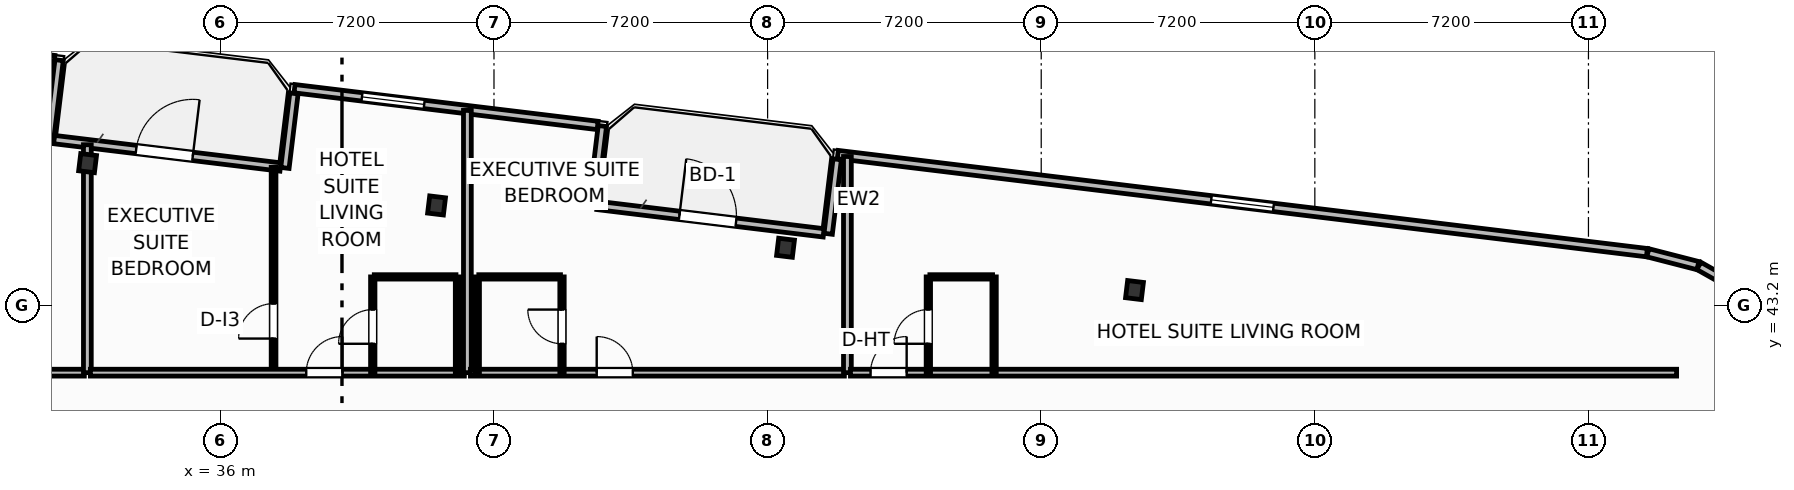
"""IFC4 building model, lengths in metres.
Left out: names, types, materials, properties, quantities, classifications, styles, units other than length and angle.
Written with IfcOpenShell. Run it as: python <this file> out.ifc"""

import sys

from ifc_helpers import new_model, si_unit, direction, frame, frame_2d, origin, origin_2d, place, context, subcontext, project, spatial, rectangle, i_section, extrude, element, fill, save


model = new_model("IFC4")
c1 = context("Model", 3, precision=1e-05, world=origin(), true_north=direction((0.0, 1.0)))
c2 = subcontext(c1, "Body", "Model", "MODEL_VIEW")
j1 = project(units=[si_unit("LENGTHUNIT", "METRE"), si_unit("PLANEANGLEUNIT", "RADIAN")], contexts=[c1])
p1 = place(None, origin())
s1 = spatial("IfcSite", under=j1, at=p1, CompositionType="ELEMENT")
p2 = place(p1, origin())
s2 = spatial("IfcBuilding", under=s1, at=p2, CompositionType="ELEMENT")
p3 = place(p2, frame((0.0, 0.0, 129.1)))
s3 = spatial("IfcBuildingStorey", under=s2, at=p3, CompositionType="ELEMENT", Elevation=129.1)
for number, where, z_axis, x_axis in (
    (1, (60.054, 43.603, 0.0), (0.0, 0.0, 1.0), (0.993, -0.12, 0.0)),
    (2, (50.872, 44.717, 0.0), (0.0, 0.0, 1.0), (0.993, -0.12, 0.0)),
    (3, (41.689, 45.83, 0.0), (0.0, 0.0, 1.0), (0.993, -0.12, 0.0)),
    (4, (32.506, 46.943, 0.0), (0.0, 0.0, 1.0), (0.993, -0.12, 0.0)),
):
    element("IfcColumn", number, at=place(p3, frame(where, z_axis=z_axis, x_axis=x_axis)), inside=s3, PredefinedType="COLUMN", context=c2, shape_type="SweptSolid", body=[
        extrude(i_section(OverallWidth=0.418, OverallDepth=0.455, WebThickness=0.042, FlangeThickness=0.068, FilletRadius=0.025, at=origin_2d()), origin(), (0.0, 0.0, 1.0), 3.7),
    ])
p4 = place(p3, frame((31.624, 47.563, 0.0), z_axis=(0.0, 0.0, 1.0), x_axis=(0.992729951822, -0.120362962556, 0.0)))
e5 = element("IfcWall", 5, at=p4, inside=s3, PredefinedType="SOLIDWALL", context=c2, shape_type="SweptSolid", body=[
    extrude(rectangle(XDim=6.0, YDim=0.22, at=frame_2d((3.0, 0.0))), origin(), (0.0, 0.0, 1.0), 2.73),
])
p5 = place(p4, frame((2.176, 0.0, 0.0)))
e6 = element("IfcOpeningElement", 6, at=p5, cuts=e5, PredefinedType="OPENING", context=c2, shape_type="SweptSolid", body=[
    extrude(rectangle(XDim=1.5, YDim=2.25, at=frame_2d((0.75, 1.125))), frame((0.0, 0.12, 0.0), z_axis=(0.0, -1.0, 0.0), x_axis=(1.0, 0.0, 0.0)), (0.0, 0.0, 1.0), 0.24),
])
p6 = place(p3, frame((45.92, 45.831, 0.0), z_axis=(0.0, 0.0, 1.0), x_axis=(0.992729951822, -0.120362962556, 0.0)))
e7 = element("IfcWall", 7, at=p6, inside=s3, PredefinedType="SOLIDWALL", context=c2, shape_type="SweptSolid", body=[
    extrude(rectangle(XDim=6.0, YDim=0.22, at=frame_2d((3.0, 0.0))), origin(), (0.0, 0.0, 1.0), 2.73),
])
p7 = place(p6, frame((2.176, 0.0, 0.0)))
e8 = element("IfcOpeningElement", 8, at=p7, cuts=e7, PredefinedType="OPENING", context=c2, shape_type="SweptSolid", body=[
    extrude(rectangle(XDim=1.5, YDim=2.25, at=frame_2d((0.75, 1.125))), frame((0.0, 0.12, 0.0), z_axis=(0.0, -1.0, 0.0), x_axis=(1.0, 0.0, 0.0)), (0.0, 0.0, 1.0), 0.24),
])
p8 = place(p3, frame((76.084, 43.575, 0.0), z_axis=(0.0, 0.0, 1.0), x_axis=(-0.871093268227, 0.491117621399, 0.0)))
e9 = element("IfcWall", 9, at=p8, inside=s3, PredefinedType="SOLIDWALL", context=c2, shape_type="SweptSolid", body=[
    extrude(rectangle(XDim=1.353, YDim=0.22, at=frame_2d((0.677, 0.0))), origin(), (0.0, 0.0, 1.0), 2.73),
])
p9 = place(p3, frame((74.881, 44.246, 0.0), z_axis=(0.0, 0.0, 1.0), x_axis=(-0.968549775063, 0.248819881091, 0.0)))
e10 = element("IfcWall", 10, at=p9, inside=s3, PredefinedType="SOLIDWALL", context=c2, shape_type="SweptSolid", body=[
    extrude(rectangle(XDim=1.361, YDim=0.22, at=frame_2d((0.68, 0.0))), origin(), (0.0, 0.0, 1.0), 2.73),
])
p10 = place(p3, frame((73.538, 44.588, 0.0), z_axis=(0.0, 0.0, 1.0), x_axis=(-0.992733493583, 0.120333747213, 0.0)))
e11 = element("IfcWall", 11, at=p10, inside=s3, PredefinedType="SOLIDWALL", context=c2, shape_type="SweptSolid", body=[
    extrude(rectangle(XDim=21.447, YDim=0.22, at=frame_2d((10.724, 0.0))), origin(), (0.0, 0.0, 1.0), 2.73),
])
p11 = place(p10, frame((9.899, 0.0, 0.8)))
e12 = element("IfcOpeningElement", 12, at=p11, cuts=e11, PredefinedType="OPENING", context=c2, shape_type="SweptSolid", body=[
    extrude(rectangle(XDim=1.65, YDim=1.65, at=frame_2d((0.825, 0.825))), frame((0.0, 0.12, 0.0), z_axis=(0.0, -1.0, 0.0), x_axis=(1.0, 0.0, 0.0)), (0.0, 0.0, 1.0), 0.24),
])
p12 = place(p3, frame((52.231, 47.045, 0.0), z_axis=(0.0, 0.0, 1.0), x_axis=(-0.120275992932, -0.992740492538, 0.0)))
e13 = element("IfcWall", 13, at=p12, inside=s3, PredefinedType="SOLIDWALL", context=c2, shape_type="SweptSolid", body=[
    extrude(rectangle(XDim=1.975, YDim=0.22, at=frame_2d((0.988, 0.0))), origin(), (0.0, 0.0, 1.0), 2.73),
])
p13 = place(p3, frame((45.799, 45.835, 0.0), z_axis=(0.0, 0.0, 1.0), x_axis=(0.120314009587, 0.992735885871, 0.0)))
e14 = element("IfcWall", 14, at=p13, inside=s3, PredefinedType="SOLIDWALL", context=c2, shape_type="SweptSolid", body=[
    extrude(rectangle(XDim=2.1, YDim=0.22, at=frame_2d((1.05, 0.0))), origin(), (0.0, 0.0, 1.0), 2.73),
])
p14 = place(p3, frame((45.928, 47.935, 0.0), z_axis=(0.0, 0.0, 1.0), x_axis=(-0.992730591876, 0.120357683402, 0.0)))
e15 = element("IfcWall", 15, at=p14, inside=s3, PredefinedType="SOLIDWALL", context=c2, shape_type="SweptSolid", body=[
    extrude(rectangle(XDim=8.035, YDim=0.22, at=frame_2d((4.017, 0.0))), origin(), (0.0, 0.0, 1.0), 2.73),
])
p15 = place(p14, frame((4.597, 0.0, 0.8)))
e16 = element("IfcOpeningElement", 16, at=p15, cuts=e15, PredefinedType="OPENING", context=c2, shape_type="SweptSolid", body=[
    extrude(rectangle(XDim=1.65, YDim=1.65, at=frame_2d((0.825, 0.825))), frame((0.0, 0.12, 0.0), z_axis=(0.0, -1.0, 0.0), x_axis=(1.0, 0.0, 0.0)), (0.0, 0.0, 1.0), 0.24),
])
p16 = place(p3, frame((37.936, 48.778, 0.0), z_axis=(0.0, 0.0, 1.0), x_axis=(-0.120397815541, -0.992725725472, 0.0)))
e17 = element("IfcWall", 17, at=p16, inside=s3, PredefinedType="SOLIDWALL", context=c2, shape_type="SweptSolid", body=[
    extrude(rectangle(XDim=1.975, YDim=0.22, at=frame_2d((0.988, 0.0))), origin(), (0.0, 0.0, 1.0), 2.73),
])
p17 = place(p3, frame((31.504, 47.568, 0.0), z_axis=(0.0, 0.0, 1.0), x_axis=(0.120341784665, 0.992732519294, 0.0)))
e18 = element("IfcWall", 18, at=p17, inside=s3, PredefinedType="SOLIDWALL", context=c2, shape_type="SweptSolid", body=[
    extrude(rectangle(XDim=2.1, YDim=0.22, at=frame_2d((1.05, 0.0))), origin(), (0.0, 0.0, 1.0), 2.73),
])
p18 = place(p3, frame((31.633, 49.668, 0.0), z_axis=(0.0, 0.0, 1.0), x_axis=(-0.992731670483, 0.120348786531, 0.0)))
e19 = element("IfcWall", 19, at=p18, inside=s3, PredefinedType="SOLIDWALL", context=c2, shape_type="SweptSolid", body=[
    extrude(rectangle(XDim=21.347, YDim=0.22, at=frame_2d((10.674, 0.0))), origin(), (0.0, 0.0, 1.0), 2.73),
])
p19 = place(p18, frame((9.849, 0.0, 0.8)))
e20 = element("IfcOpeningElement", 20, at=p19, cuts=e19, PredefinedType="OPENING", context=c2, shape_type="SweptSolid", body=[
    extrude(rectangle(XDim=1.65, YDim=1.65, at=frame_2d((0.825, 0.825))), frame((0.0, 0.12, 0.0), z_axis=(0.0, -1.0, 0.0), x_axis=(1.0, 0.0, 0.0)), (0.0, 0.0, 1.0), 0.24),
])
p20 = place(p3, frame((3.864, 41.43, 0.0), z_axis=(0.0, 0.0, 1.0), x_axis=(1.0, 0.0, 0.0)))
e21 = element("IfcWall", 21, at=p20, inside=s3, PredefinedType="PARTITIONING", context=c2, shape_type="SweptSolid", body=[
    extrude(rectangle(XDim=28.556, YDim=0.18, at=frame_2d((14.278, 0.0))), origin(), (0.0, 0.0, 1.0), 3.45),
])
p21 = place(p20, frame((21.409, 0.0, 0.0)))
e22 = element("IfcOpeningElement", 22, at=p21, cuts=e21, PredefinedType="OPENING", context=c2, shape_type="SweptSolid", body=[
    extrude(rectangle(XDim=0.95, YDim=2.15, at=frame_2d((0.475, 1.075))), frame((0.0, 0.1, 0.0), z_axis=(0.0, -1.0, 0.0), x_axis=(1.0, 0.0, 0.0)), (0.0, 0.0, 1.0), 0.2),
])
p22 = place(p3, frame((32.5, 41.43, 0.0), z_axis=(0.0, 0.0, 1.0), x_axis=(0.0, 1.0, 0.0)))
e23 = element("IfcWall", 23, at=p22, inside=s3, PredefinedType="PARTITIONING", context=c2, shape_type="SweptSolid", body=[
    extrude(rectangle(XDim=5.997, YDim=0.205, at=frame_2d((2.999, 0.0))), origin(), (0.0, 0.0, 1.0), 2.662),
])
p23 = place(p3, frame((37.4, 41.43, 0.0), z_axis=(0.0, 0.0, 1.0), x_axis=(0.0, 1.0, 0.0)))
e24 = element("IfcWall", 24, at=p23, inside=s3, PredefinedType="PARTITIONING", context=c2, shape_type="SweptSolid", body=[
    extrude(rectangle(XDim=5.403, YDim=0.125, at=frame_2d((2.702, 0.0))), origin(), (0.0, 0.0, 1.0), 3.45),
])
p24 = place(p23, frame((0.897, 0.0, 0.0)))
e25 = element("IfcOpeningElement", 25, at=p24, cuts=e24, PredefinedType="OPENING", context=c2, shape_type="SweptSolid", body=[
    extrude(rectangle(XDim=0.92, YDim=2.05, at=frame_2d((0.46, 1.025))), frame((0.0, 0.073, 0.0), z_axis=(0.0, -1.0, 0.0), x_axis=(1.0, 0.0, 0.0)), (0.0, 0.0, 1.0), 0.145),
])
p25 = place(p3, frame((32.58, 41.43, 0.0), z_axis=(0.0, 0.0, 1.0), x_axis=(1.0, 0.0, 0.0)))
e26 = element("IfcWall", 26, at=p25, inside=s3, PredefinedType="PARTITIONING", context=c2, shape_type="SweptSolid", body=[
    extrude(rectangle(XDim=9.84, YDim=0.18, at=frame_2d((4.92, 0.0))), origin(), (0.0, 0.0, 1.0), 3.45),
])
p26 = place(p25, frame((5.68, 0.0, 0.0)))
e27 = element("IfcOpeningElement", 27, at=p26, cuts=e26, PredefinedType="OPENING", context=c2, shape_type="SweptSolid", body=[
    extrude(rectangle(XDim=0.95, YDim=2.15, at=frame_2d((0.475, 1.075))), frame((0.0, 0.1, 0.0), z_axis=(0.0, -1.0, 0.0), x_axis=(1.0, 0.0, 0.0)), (0.0, 0.0, 1.0), 0.2),
])
p27 = place(p3, frame((40.05, 43.95, 0.0), z_axis=(0.0, 0.0, 1.0), x_axis=(1.0, 0.0, 0.0)))
e28 = element("IfcWall", 28, at=p27, inside=s3, PredefinedType="PARTITIONING", context=c2, shape_type="SweptSolid", body=[
    extrude(rectangle(XDim=2.15, YDim=0.115, at=frame_2d((1.075, 0.0))), origin(), (0.0, 0.0, 1.0), 3.45),
])
p28 = place(p3, frame((40.01, 41.43, 0.0), z_axis=(0.0, 0.0, 1.0), x_axis=(0.0, 1.0, 0.0)))
e29 = element("IfcWall", 29, at=p28, inside=s3, PredefinedType="PARTITIONING", context=c2, shape_type="SweptSolid", body=[
    extrude(rectangle(XDim=2.52, YDim=0.115, at=frame_2d((1.26, 0.0))), origin(), (0.0, 0.0, 1.0), 3.45),
])
p29 = place(p28, frame((0.76, 0.0, 0.0)))
e30 = element("IfcOpeningElement", 30, at=p29, cuts=e29, PredefinedType="OPENING", context=c2, shape_type="SweptSolid", body=[
    extrude(rectangle(XDim=0.9, YDim=2.05, at=frame_2d((0.45, 1.025))), frame((0.0, 0.067, 0.0), z_axis=(0.0, -1.0, 0.0), x_axis=(1.0, 0.0, 0.0)), (0.0, 0.0, 1.0), 0.135),
])
p30 = place(p3, frame((42.24, 41.43, 0.0), z_axis=(0.0, 0.0, 1.0), x_axis=(0.0, 1.0, 0.0)))
e31 = element("IfcWall", 31, at=p30, inside=s3, PredefinedType="PARTITIONING", context=c2, shape_type="SweptSolid", body=[
    extrude(rectangle(XDim=2.52, YDim=0.115, at=frame_2d((1.26, 0.0))), origin(), (0.0, 0.0, 1.0), 2.662),
])
p31 = place(p3, frame((42.5, 41.43, 0.0), z_axis=(0.0, 0.0, 1.0), x_axis=(0.0, 1.0, 0.0)))
e32 = element("IfcWall", 32, at=p31, inside=s3, PredefinedType="PARTITIONING", context=c2, shape_type="SweptSolid", body=[
    extrude(rectangle(XDim=6.9, YDim=0.205, at=frame_2d((3.45, 0.0))), origin(), (0.0, 0.0, 1.0), 2.662),
])
p32 = place(p3, frame((42.58, 41.43, 0.0), z_axis=(0.0, 0.0, 1.0), x_axis=(1.0, 0.0, 0.0)))
e33 = element("IfcWall", 33, at=p32, inside=s3, PredefinedType="PARTITIONING", context=c2, shape_type="SweptSolid", body=[
    extrude(rectangle(XDim=9.84, YDim=0.18, at=frame_2d((4.92, 0.0))), origin(), (0.0, 0.0, 1.0), 3.45),
])
p33 = place(p32, frame((3.323, 0.0, 0.0)))
e34 = element("IfcOpeningElement", 34, at=p33, cuts=e33, PredefinedType="OPENING", context=c2, shape_type="SweptSolid", body=[
    extrude(rectangle(XDim=0.95, YDim=2.15, at=frame_2d((0.475, 1.075))), frame((0.0, 0.1, 0.0), z_axis=(0.0, -1.0, 0.0), x_axis=(1.0, 0.0, 0.0)), (0.0, 0.0, 1.0), 0.2),
])
p34 = place(p3, frame((42.8, 43.95, 0.0), z_axis=(0.0, 0.0, 1.0), x_axis=(1.0, 0.0, 0.0)))
e35 = element("IfcWall", 35, at=p34, inside=s3, PredefinedType="PARTITIONING", context=c2, shape_type="SweptSolid", body=[
    extrude(rectangle(XDim=2.15, YDim=0.115, at=frame_2d((1.075, 0.0))), origin(), (0.0, 0.0, 1.0), 3.45),
])
p35 = place(p3, frame((44.99, 41.43, 0.0), z_axis=(0.0, 0.0, 1.0), x_axis=(0.0, 1.0, 0.0)))
e36 = element("IfcWall", 36, at=p35, inside=s3, PredefinedType="PARTITIONING", context=c2, shape_type="SweptSolid", body=[
    extrude(rectangle(XDim=2.52, YDim=0.115, at=frame_2d((1.26, 0.0))), origin(), (0.0, 0.0, 1.0), 3.45),
])
p36 = place(p35, frame((0.76, 0.0, 0.0)))
e37 = element("IfcOpeningElement", 37, at=p36, cuts=e36, PredefinedType="OPENING", context=c2, shape_type="SweptSolid", body=[
    extrude(rectangle(XDim=0.9, YDim=2.05, at=frame_2d((0.45, 1.025))), frame((0.0, 0.067, 0.0), z_axis=(0.0, -1.0, 0.0), x_axis=(1.0, 0.0, 0.0)), (0.0, 0.0, 1.0), 0.135),
])
p37 = place(p3, frame((42.76, 41.43, 0.0), z_axis=(0.0, 0.0, 1.0), x_axis=(0.0, 1.0, 0.0)))
e38 = element("IfcWall", 38, at=p37, inside=s3, PredefinedType="PARTITIONING", context=c2, shape_type="SweptSolid", body=[
    extrude(rectangle(XDim=2.52, YDim=0.115, at=frame_2d((1.26, 0.0))), origin(), (0.0, 0.0, 1.0), 2.662),
])
p38 = place(p3, frame((52.5, 41.43, 0.0), z_axis=(0.0, 0.0, 1.0), x_axis=(0.0, 1.0, 0.0)))
e39 = element("IfcWall", 39, at=p38, inside=s3, PredefinedType="PARTITIONING", context=c2, shape_type="SweptSolid", body=[
    extrude(rectangle(XDim=5.688, YDim=0.205, at=frame_2d((2.844, 0.0))), origin(), (0.0, 0.0, 1.0), 3.45),
])
p39 = place(p3, frame((52.58, 41.43, 0.0), z_axis=(0.0, 0.0, 1.0), x_axis=(1.0, 0.0, 0.0)))
e40 = element("IfcWall", 40, at=p39, inside=s3, PredefinedType="PARTITIONING", context=c2, shape_type="SweptSolid", body=[
    extrude(rectangle(XDim=21.74, YDim=0.18, at=frame_2d((10.87, 0.0))), origin(), (0.0, 0.0, 1.0), 3.45),
])
p40 = place(p39, frame((0.529, 0.0, 0.0)))
e41 = element("IfcOpeningElement", 41, at=p40, cuts=e40, PredefinedType="OPENING", context=c2, shape_type="SweptSolid", body=[
    extrude(rectangle(XDim=0.95, YDim=2.15, at=frame_2d((0.475, 1.075))), frame((0.0, 0.1, 0.0), z_axis=(0.0, -1.0, 0.0), x_axis=(1.0, 0.0, 0.0)), (0.0, 0.0, 1.0), 0.2),
])
p41 = place(p3, frame((54.67, 43.95, 0.0), z_axis=(0.0, 0.0, 1.0), x_axis=(1.0, 0.0, 0.0)))
e42 = element("IfcWall", 42, at=p41, inside=s3, PredefinedType="PARTITIONING", context=c2, shape_type="SweptSolid", body=[
    extrude(rectangle(XDim=1.65, YDim=0.115, at=frame_2d((0.825, 0.0))), origin(), (0.0, 0.0, 1.0), 2.824),
])
p42 = place(p3, frame((54.63, 41.43, 0.0), z_axis=(0.0, 0.0, 1.0), x_axis=(0.0, 1.0, 0.0)))
e43 = element("IfcWall", 43, at=p42, inside=s3, PredefinedType="PARTITIONING", context=c2, shape_type="SweptSolid", body=[
    extrude(rectangle(XDim=2.52, YDim=0.115, at=frame_2d((1.26, 0.0))), origin(), (0.0, 0.0, 1.0), 3.45),
])
p43 = place(p42, frame((0.76, 0.0, 0.0)))
e44 = element("IfcOpeningElement", 44, at=p43, cuts=e43, PredefinedType="OPENING", context=c2, shape_type="SweptSolid", body=[
    extrude(rectangle(XDim=0.9, YDim=2.05, at=frame_2d((0.45, 1.025))), frame((0.0, 0.067, 0.0), z_axis=(0.0, -1.0, 0.0), x_axis=(1.0, 0.0, 0.0)), (0.0, 0.0, 1.0), 0.135),
])
p44 = place(p3, frame((56.36, 41.43, 0.0), z_axis=(0.0, 0.0, 1.0), x_axis=(0.0, 1.0, 0.0)))
e45 = element("IfcWall", 45, at=p44, inside=s3, PredefinedType="PARTITIONING", context=c2, shape_type="SweptSolid", body=[
    extrude(rectangle(XDim=2.52, YDim=0.115, at=frame_2d((1.26, 0.0))), origin(), (0.0, 0.0, 1.0), 3.45),
])
p45 = place(p5, origin())
e46 = element("IfcDoor", 46, at=p45, inside=s3, OperationType="SINGLE_SWING_RIGHT", PredefinedType="DOOR", context=c2, shape_type="SweptSolid", body=[
    extrude(rectangle(XDim=1.5, YDim=2.25, at=frame_2d((0.75, 1.125))), frame((0.0, 0.025, 0.0), z_axis=(0.0, -1.0, 0.0), x_axis=(1.0, 0.0, 0.0)), (0.0, 0.0, 1.0), 0.05),
])
fill(e6, e46)
p46 = place(p7, origin())
e47 = element("IfcDoor", 47, at=p46, inside=s3, OperationType="SINGLE_SWING_LEFT", PredefinedType="DOOR", context=c2, shape_type="SweptSolid", body=[
    extrude(rectangle(XDim=1.5, YDim=2.25, at=frame_2d((0.75, 1.125))), frame((0.0, 0.025, 0.0), z_axis=(0.0, -1.0, 0.0), x_axis=(1.0, 0.0, 0.0)), (0.0, 0.0, 1.0), 0.05),
])
fill(e8, e47)
p47 = place(p11, origin())
e48 = element("IfcWindow", 48, at=p47, inside=s3, PartitioningType="SINGLE_PANEL", PredefinedType="WINDOW", context=c2, shape_type="SweptSolid", body=[
    extrude(rectangle(XDim=1.65, YDim=1.65, at=frame_2d((0.825, 0.825))), frame((0.0, 0.03, 0.0), z_axis=(0.0, -1.0, 0.0), x_axis=(1.0, 0.0, 0.0)), (0.0, 0.0, 1.0), 0.06),
])
fill(e12, e48)
p48 = place(p15, origin())
e49 = element("IfcWindow", 49, at=p48, inside=s3, PartitioningType="SINGLE_PANEL", PredefinedType="WINDOW", context=c2, shape_type="SweptSolid", body=[
    extrude(rectangle(XDim=1.65, YDim=1.65, at=frame_2d((0.825, 0.825))), frame((0.0, 0.03, 0.0), z_axis=(0.0, -1.0, 0.0), x_axis=(1.0, 0.0, 0.0)), (0.0, 0.0, 1.0), 0.06),
])
fill(e16, e49)
p49 = place(p24, origin())
e50 = element("IfcDoor", 50, at=p49, inside=s3, OperationType="SINGLE_SWING_LEFT", PredefinedType="DOOR", context=c2, shape_type="SweptSolid", body=[
    extrude(rectangle(XDim=0.92, YDim=2.05, at=frame_2d((0.46, 1.025))), frame((0.0, 0.025, 0.0), z_axis=(0.0, -1.0, 0.0), x_axis=(1.0, 0.0, 0.0)), (0.0, 0.0, 1.0), 0.05),
])
fill(e25, e50)
p50 = place(p26, origin())
e51 = element("IfcDoor", 51, at=p50, inside=s3, OperationType="SINGLE_SWING_RIGHT", PredefinedType="DOOR", context=c2, shape_type="SweptSolid", body=[
    extrude(rectangle(XDim=0.95, YDim=2.15, at=frame_2d((0.475, 1.075))), frame((0.0, 0.025, 0.0), z_axis=(0.0, -1.0, 0.0), x_axis=(1.0, 0.0, 0.0)), (0.0, 0.0, 1.0), 0.05),
])
fill(e27, e51)
p51 = place(p29, origin())
e52 = element("IfcDoor", 52, at=p51, inside=s3, OperationType="SINGLE_SWING_LEFT", PredefinedType="DOOR", context=c2, shape_type="SweptSolid", body=[
    extrude(rectangle(XDim=0.9, YDim=2.05, at=frame_2d((0.45, 1.025))), frame((0.0, 0.025, 0.0), z_axis=(0.0, -1.0, 0.0), x_axis=(1.0, 0.0, 0.0)), (0.0, 0.0, 1.0), 0.05),
])
fill(e30, e52)
p52 = place(p33, origin())
e53 = element("IfcDoor", 53, at=p52, inside=s3, OperationType="SINGLE_SWING_LEFT", PredefinedType="DOOR", context=c2, shape_type="SweptSolid", body=[
    extrude(rectangle(XDim=0.95, YDim=2.15, at=frame_2d((0.475, 1.075))), frame((0.0, 0.025, 0.0), z_axis=(0.0, -1.0, 0.0), x_axis=(1.0, 0.0, 0.0)), (0.0, 0.0, 1.0), 0.05),
])
fill(e34, e53)
p53 = place(p36, origin())
e54 = element("IfcDoor", 54, at=p53, inside=s3, OperationType="SINGLE_SWING_RIGHT", PredefinedType="DOOR", context=c2, shape_type="SweptSolid", body=[
    extrude(rectangle(XDim=0.9, YDim=2.05, at=frame_2d((0.45, 1.025))), frame((0.0, 0.025, 0.0), z_axis=(0.0, -1.0, 0.0), x_axis=(1.0, 0.0, 0.0)), (0.0, 0.0, 1.0), 0.05),
])
fill(e37, e54)
p54 = place(p40, origin())
e55 = element("IfcDoor", 55, at=p54, inside=s3, OperationType="SINGLE_SWING_RIGHT", PredefinedType="DOOR", context=c2, shape_type="SweptSolid", body=[
    extrude(rectangle(XDim=0.95, YDim=2.15, at=frame_2d((0.475, 1.075))), frame((0.0, 0.025, 0.0), z_axis=(0.0, -1.0, 0.0), x_axis=(1.0, 0.0, 0.0)), (0.0, 0.0, 1.0), 0.05),
])
fill(e41, e55)
p55 = place(p43, origin())
e56 = element("IfcDoor", 56, at=p55, inside=s3, OperationType="SINGLE_SWING_LEFT", PredefinedType="DOOR", context=c2, shape_type="SweptSolid", body=[
    extrude(rectangle(XDim=0.9, YDim=2.05, at=frame_2d((0.45, 1.025))), frame((0.0, 0.025, 0.0), z_axis=(0.0, -1.0, 0.0), x_axis=(1.0, 0.0, 0.0)), (0.0, 0.0, 1.0), 0.05),
])
fill(e44, e56)
save(model, sys.argv[1])
